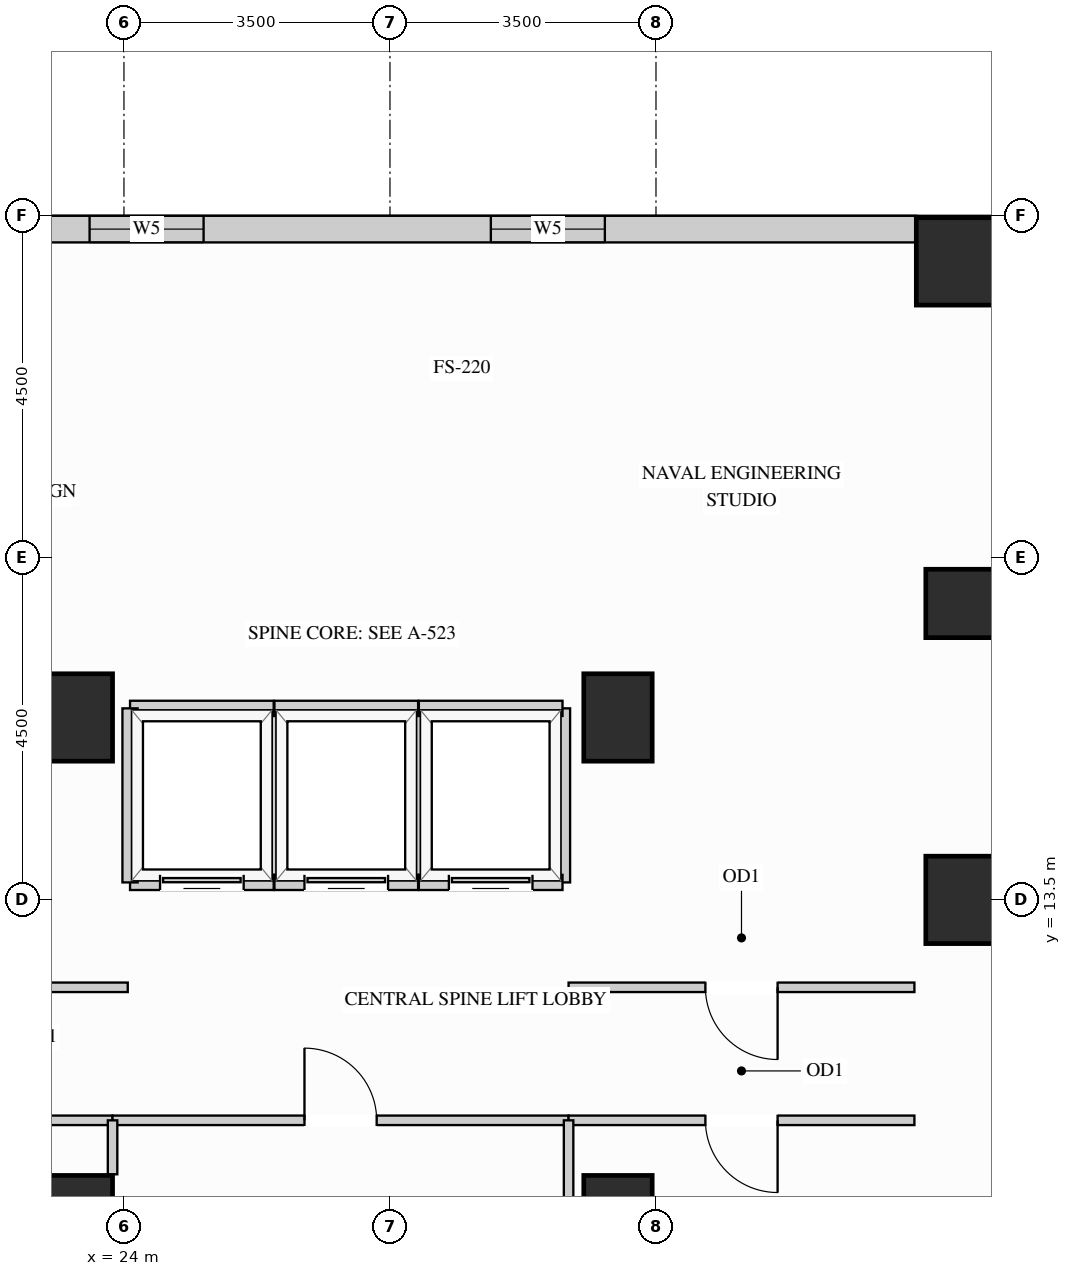
"""IFC4 building model, lengths in metres.
Left out: names, types, materials, properties, quantities, classifications, styles, units other than length and angle.
Written with IfcOpenShell. Run it as: python <this file> out.ifc"""

import sys

from ifc_helpers import new_model, si_unit, direction, frame, frame_2d, origin, origin_2d, place, context, subcontext, project, spatial, rectangle, extrude, source, transform, mapped, element, fill, save


model = new_model("IFC4")
c1 = context("Model", 3, precision=1e-05, world=origin(), true_north=direction((0.0, 1.0)))
c2 = subcontext(c1, "Body", "Model", "MODEL_VIEW")
j1 = project(units=[si_unit("LENGTHUNIT", "METRE"), si_unit("PLANEANGLEUNIT", "RADIAN")], contexts=[c1])
p1 = place(None, origin())
s1 = spatial("IfcSite", under=j1, at=p1, CompositionType="ELEMENT")
p2 = place(p1, origin())
s2 = spatial("IfcBuilding", under=s1, at=p2, CompositionType="ELEMENT")
p3 = place(p2, frame((0.0, 0.0, 84.6)))
s3 = spatial("IfcBuildingStorey", under=s2, at=p3, CompositionType="ELEMENT", Elevation=84.6)
m1 = source(origin(), c2, "Body", "SweptSolid", [
    extrude(rectangle(XDim=0.9, YDim=0.9, at=origin_2d()), origin(), (0.0, 0.0, 1.0), 3.38),
])
p4 = place(p3, frame((35.0, 17.4, 0.0), z_axis=(0.0, 0.0, 1.0), x_axis=(1.0, 0.0, 0.0)))
e1 = element("IfcColumn", 1, at=p4, inside=s3, PredefinedType="COLUMN", context=c2, shape_type="MappedRepresentation", body=[
    mapped(m1, transform((0.0, 0.0, 0.0), x_axis=(1.0, 0.0, 0.0), y_axis=(0.0, 1.0, 0.0), z_axis=(0.0, 0.0, 1.0))),
])
m2 = source(origin(), c2, "Body", "SweptSolid", [
    extrude(rectangle(XDim=0.9, YDim=1.15, at=origin_2d()), origin(), (0.0, 0.0, 1.0), 3.38),
])
for number, where, z_axis, x_axis in (
    (2, (35.0, 13.5, 0.0), (0.0, 0.0, 1.0), (1.0, 0.0, 0.0)),
    (3, (23.4, 15.9, 0.0), (0.0, 0.0, 1.0), (1.0, 0.0, 0.0)),
    (4, (23.4, 9.3, 0.0), (0.0, 0.0, 1.0), (1.0, 0.0, 0.0)),
    (5, (30.5, 15.9, 0.0), (0.0, 0.0, 1.0), (1.0, 0.0, 0.0)),
    (6, (30.5, 9.3, 0.0), (0.0, 0.0, 1.0), (1.0, 0.0, 0.0)),
):
    element("IfcColumn", number, at=place(p3, frame(where, z_axis=z_axis, x_axis=x_axis)), inside=s3, PredefinedType="COLUMN", context=c2, shape_type="MappedRepresentation", body=[
        mapped(m2, transform((0.0, 0.0, 0.0), x_axis=(1.0, 0.0, 0.0), y_axis=(0.0, 1.0, 0.0), z_axis=(0.0, 0.0, 1.0))),
    ])
m3 = source(origin(), c2, "Body", "SweptSolid", [
    extrude(rectangle(XDim=1.15, YDim=1.15, at=origin_2d()), origin(), (0.0, 0.0, 1.0), 3.38),
])
p5 = place(p3, frame((35.0, 21.9, 0.0), z_axis=(0.0, 0.0, 1.0), x_axis=(1.0, 0.0, 0.0)))
e7 = element("IfcColumn", 7, at=p5, inside=s3, PredefinedType="COLUMN", context=c2, shape_type="MappedRepresentation", body=[
    mapped(m3, transform((0.0, 0.0, 0.0), x_axis=(1.0, 0.0, 0.0), y_axis=(0.0, 1.0, 0.0), z_axis=(0.0, 0.0, 1.0))),
])
p6 = place(p3, frame((34.427, 22.325, 0.0), z_axis=(0.0, 0.0, 1.0), x_axis=(-1.0, 0.0, 0.0)))
e8 = element("IfcWall", 8, at=p6, inside=s3, PredefinedType="SOLIDWALL", context=c2, shape_type="SweptSolid", body=[
    extrude(rectangle(XDim=14.979, YDim=0.35, at=frame_2d((7.49, 0.0))), origin(), (0.0, 0.0, 1.0), 3.365),
])
p7 = place(p6, frame((4.1, 0.0, 0.78)))
e9 = element("IfcOpeningElement", 9, at=p7, cuts=e8, PredefinedType="OPENING", context=c2, shape_type="SweptSolid", body=[
    extrude(rectangle(XDim=1.5, YDim=2.0, at=frame_2d((0.75, 1.0))), frame((0.0, 0.185, 0.0), z_axis=(0.0, -1.0, 0.0), x_axis=(1.0, 0.0, 0.0)), (0.0, 0.0, 1.0), 0.37),
])
p8 = place(p6, frame((9.379, 0.0, 0.78)))
e10 = element("IfcOpeningElement", 10, at=p8, cuts=e8, PredefinedType="OPENING", context=c2, shape_type="SweptSolid", body=[
    extrude(rectangle(XDim=1.5, YDim=2.0, at=frame_2d((0.75, 1.0))), frame((0.0, 0.185, 0.0), z_axis=(0.0, -1.0, 0.0), x_axis=(1.0, 0.0, 0.0)), (0.0, 0.0, 1.0), 0.37),
])
p9 = place(p3, frame((29.85, 12.35, 0.0), z_axis=(0.0, 0.0, 1.0), x_axis=(1.0, 0.0, 0.0)))
e11 = element("IfcWall", 11, at=p9, inside=s3, PredefinedType="PARTITIONING", context=c2, shape_type="SweptSolid", body=[
    extrude(rectangle(XDim=4.55, YDim=0.125, at=frame_2d((2.275, 0.0))), origin(), (0.0, 0.0, 1.0), 3.365),
])
p10 = place(p9, frame((1.8, 0.0, 0.0)))
e12 = element("IfcOpeningElement", 12, at=p10, cuts=e11, PredefinedType="OPENING", context=c2, shape_type="SweptSolid", body=[
    extrude(rectangle(XDim=0.95, YDim=2.15, at=frame_2d((0.475, 1.075))), frame((0.0, 0.073, 0.0), z_axis=(0.0, -1.0, 0.0), x_axis=(1.0, 0.0, 0.0)), (0.0, 0.0, 1.0), 0.145),
])
p11 = place(p3, frame((19.5, 12.35, 0.0), z_axis=(0.0, 0.0, 1.0), x_axis=(1.0, 0.0, 0.0)))
e13 = element("IfcWall", 13, at=p11, inside=s3, PredefinedType="PARTITIONING", context=c2, shape_type="SweptSolid", body=[
    extrude(rectangle(XDim=4.55, YDim=0.125, at=frame_2d((2.275, 0.0))), origin(), (0.0, 0.0, 1.0), 3.365),
])
p12 = place(p11, frame((1.8, 0.0, 0.0)))
e14 = element("IfcOpeningElement", 14, at=p12, cuts=e13, PredefinedType="OPENING", context=c2, shape_type="SweptSolid", body=[
    extrude(rectangle(XDim=0.95, YDim=2.15, at=frame_2d((0.475, 1.075))), frame((0.0, 0.073, 0.0), z_axis=(0.0, -1.0, 0.0), x_axis=(1.0, 0.0, 0.0)), (0.0, 0.0, 1.0), 0.145),
])
p13 = place(p3, frame((19.5, 10.6, 0.0), z_axis=(0.0, 0.0, 1.0), x_axis=(1.0, 0.0, 0.0)))
e15 = element("IfcWall", 15, at=p13, inside=s3, PredefinedType="PARTITIONING", context=c2, shape_type="SweptSolid", body=[
    extrude(rectangle(XDim=4.35, YDim=0.125, at=frame_2d((2.175, 0.0))), origin(), (0.0, 0.0, 1.0), 3.365),
])
p14 = place(p13, frame((1.7, 0.0, 0.0)))
e16 = element("IfcOpeningElement", 16, at=p14, cuts=e15, PredefinedType="OPENING", context=c2, shape_type="SweptSolid", body=[
    extrude(rectangle(XDim=0.95, YDim=2.15, at=frame_2d((0.475, 1.075))), frame((0.0, 0.073, 0.0), z_axis=(0.0, -1.0, 0.0), x_axis=(1.0, 0.0, 0.0)), (0.0, 0.0, 1.0), 0.145),
])
p15 = place(p3, frame((23.85, 10.6, 0.0), z_axis=(0.0, 0.0, 1.0), x_axis=(1.0, 0.0, 0.0)))
e17 = element("IfcWall", 17, at=p15, inside=s3, PredefinedType="PARTITIONING", context=c2, shape_type="SweptSolid", body=[
    extrude(rectangle(XDim=6.0, YDim=0.125, at=frame_2d((3.0, 0.0))), origin(), (0.0, 0.0, 1.0), 3.365),
])
p16 = place(p15, frame((2.525, 0.0, 0.0)))
e18 = element("IfcOpeningElement", 18, at=p16, cuts=e17, PredefinedType="OPENING", context=c2, shape_type="SweptSolid", body=[
    extrude(rectangle(XDim=0.95, YDim=2.15, at=frame_2d((0.475, 1.075))), frame((0.0, 0.073, 0.0), z_axis=(0.0, -1.0, 0.0), x_axis=(1.0, 0.0, 0.0)), (0.0, 0.0, 1.0), 0.145),
])
p17 = place(p3, frame((29.85, 10.6, 0.0), z_axis=(0.0, 0.0, 1.0), x_axis=(1.0, 0.0, 0.0)))
e19 = element("IfcWall", 19, at=p17, inside=s3, PredefinedType="PARTITIONING", context=c2, shape_type="SweptSolid", body=[
    extrude(rectangle(XDim=4.55, YDim=0.125, at=frame_2d((2.275, 0.0))), origin(), (0.0, 0.0, 1.0), 3.365),
])
p18 = place(p17, frame((1.8, 0.0, 0.0)))
e20 = element("IfcOpeningElement", 20, at=p18, cuts=e19, PredefinedType="OPENING", context=c2, shape_type="SweptSolid", body=[
    extrude(rectangle(XDim=0.95, YDim=2.15, at=frame_2d((0.475, 1.075))), frame((0.0, 0.073, 0.0), z_axis=(0.0, -1.0, 0.0), x_axis=(1.0, 0.0, 0.0)), (0.0, 0.0, 1.0), 0.145),
])
m4 = source(origin(), c2, "Body", "SweptSolid", [
    extrude(rectangle(XDim=0.71, YDim=0.125, at=frame_2d((0.355, 0.0))), origin(), (0.0, 0.0, 1.0), 3.365),
])
p19 = place(p3, frame((23.85, 9.89, 0.0), z_axis=(0.0, 0.0, 1.0), x_axis=(0.0, 1.0, 0.0)))
e21 = element("IfcWall", 21, at=p19, inside=s3, PredefinedType="PARTITIONING", context=c2, shape_type="MappedRepresentation", body=[
    mapped(m4, transform((0.0, 0.0, 0.0), x_axis=(1.0, 0.0, 0.0), y_axis=(0.0, 1.0, 0.0), z_axis=(0.0, 0.0, 1.0))),
])
m5 = source(origin(), c2, "Body", "SweptSolid", [
    extrude(rectangle(XDim=5.748, YDim=0.125, at=frame_2d((2.874, 0.0))), origin(), (0.0, 0.0, 1.0), 3.365),
])
p20 = place(p3, frame((29.85, 4.852, 0.0), z_axis=(0.0, 0.0, 1.0), x_axis=(0.0, 1.0, 0.0)))
e22 = element("IfcWall", 22, at=p20, inside=s3, PredefinedType="PARTITIONING", context=c2, shape_type="MappedRepresentation", body=[
    mapped(m5, transform((0.0, 0.0, 0.0), x_axis=(1.0, 0.0, 0.0), y_axis=(0.0, 1.0, 0.0), z_axis=(0.0, 0.0, 1.0))),
])
m6 = source(origin(), c2, "Body", "SweptSolid", [
    extrude(rectangle(XDim=2.29, YDim=0.2, at=frame_2d((1.145, 0.0))), origin(), (0.0, 0.0, 1.0), 3.365),
])
p21 = place(p3, frame((25.97, 13.73, 0.0), z_axis=(0.0, 0.0, 1.0), x_axis=(0.0, 1.0, 0.0)))
e23 = element("IfcWall", 23, at=p21, inside=s3, PredefinedType="PARTITIONING", context=c2, shape_type="MappedRepresentation", body=[
    mapped(m6, transform((0.0, 0.0, 0.0), x_axis=(1.0, 0.0, 0.0), y_axis=(0.0, 1.0, 0.0), z_axis=(0.0, 0.0, 1.0))),
])
m7 = source(origin(), c2, "Body", "SweptSolid", [
    extrude(rectangle(XDim=1.89, YDim=0.2, at=frame_2d((0.945, 0.0))), origin(), (0.0, 0.0, 1.0), 2.677),
])
p22 = place(p3, frame((24.08, 16.02, 0.0), z_axis=(0.0, 0.0, 1.0), x_axis=(1.0, 0.0, 0.0)))
e24 = element("IfcWall", 24, at=p22, inside=s3, PredefinedType="PARTITIONING", context=c2, shape_type="MappedRepresentation", body=[
    mapped(m7, transform((0.0, 0.0, 0.0), x_axis=(1.0, 0.0, 0.0), y_axis=(0.0, 1.0, 0.0), z_axis=(0.0, 0.0, 1.0))),
])
p23 = place(p3, frame((24.08, 13.73, 0.0), z_axis=(0.0, 0.0, 1.0), x_axis=(1.0, 0.0, 0.0)))
e25 = element("IfcWall", 25, at=p23, inside=s3, PredefinedType="PARTITIONING", context=c2, shape_type="SweptSolid", body=[
    extrude(rectangle(XDim=1.89, YDim=0.2, at=frame_2d((0.945, 0.0))), origin(), (0.0, 0.0, 1.0), 2.446),
])
p24 = place(p23, frame((0.395, 0.0, 0.0)))
e26 = element("IfcOpeningElement", 26, at=p24, cuts=e25, PredefinedType="OPENING", context=c2, shape_type="SweptSolid", body=[
    extrude(rectangle(XDim=1.1, YDim=2.2, at=frame_2d((0.55, 1.1))), frame((0.0, 0.11, 0.0), z_axis=(0.0, -1.0, 0.0), x_axis=(1.0, 0.0, 0.0)), (0.0, 0.0, 1.0), 0.22),
])
for number, where, z_axis, x_axis in (
    (27, (24.08, 13.73, 0.0), (0.0, 0.0, 1.0), (0.0, 1.0, 0.0)),
    (28, (27.87, 13.73, 0.0), (0.0, 0.0, 1.0), (0.0, 1.0, 0.0)),
):
    element("IfcWall", number, at=place(p3, frame(where, z_axis=z_axis, x_axis=x_axis)), inside=s3, PredefinedType="PARTITIONING", context=c2, shape_type="MappedRepresentation", body=[
        mapped(m6, transform((0.0, 0.0, 0.0), x_axis=(1.0, 0.0, 0.0), y_axis=(0.0, 1.0, 0.0), z_axis=(0.0, 0.0, 1.0))),
    ])
m8 = source(origin(), c2, "Body", "SweptSolid", [
    extrude(rectangle(XDim=1.89, YDim=0.2, at=frame_2d((0.945, 0.0))), origin(), (0.0, 0.0, 1.0), 2.677),
])
p25 = place(p3, frame((25.98, 16.02, 0.0), z_axis=(0.0, 0.0, 1.0), x_axis=(1.0, 0.0, 0.0)))
e29 = element("IfcWall", 29, at=p25, inside=s3, PredefinedType="PARTITIONING", context=c2, shape_type="MappedRepresentation", body=[
    mapped(m8, transform((0.0, 0.0, 0.0), x_axis=(1.0, 0.0, 0.0), y_axis=(0.0, 1.0, 0.0), z_axis=(0.0, 0.0, 1.0))),
])
p26 = place(p3, frame((25.98, 13.73, 0.0), z_axis=(0.0, 0.0, 1.0), x_axis=(1.0, 0.0, 0.0)))
e30 = element("IfcWall", 30, at=p26, inside=s3, PredefinedType="PARTITIONING", context=c2, shape_type="SweptSolid", body=[
    extrude(rectangle(XDim=1.89, YDim=0.2, at=frame_2d((0.945, 0.0))), origin(), (0.0, 0.0, 1.0), 2.446),
])
p27 = place(p26, frame((0.395, 0.0, 0.0)))
e31 = element("IfcOpeningElement", 31, at=p27, cuts=e30, PredefinedType="OPENING", context=c2, shape_type="SweptSolid", body=[
    extrude(rectangle(XDim=1.1, YDim=2.2, at=frame_2d((0.55, 1.1))), frame((0.0, 0.11, 0.0), z_axis=(0.0, -1.0, 0.0), x_axis=(1.0, 0.0, 0.0)), (0.0, 0.0, 1.0), 0.22),
])
p28 = place(p3, frame((29.77, 13.73, 0.0), z_axis=(0.0, 0.0, 1.0), x_axis=(0.0, 1.0, 0.0)))
e32 = element("IfcWall", 32, at=p28, inside=s3, PredefinedType="PARTITIONING", context=c2, shape_type="MappedRepresentation", body=[
    mapped(m6, transform((0.0, 0.0, 0.0), x_axis=(1.0, 0.0, 0.0), y_axis=(0.0, 1.0, 0.0), z_axis=(0.0, 0.0, 1.0))),
])
p29 = place(p3, frame((27.88, 16.02, 0.0), z_axis=(0.0, 0.0, 1.0), x_axis=(1.0, 0.0, 0.0)))
e33 = element("IfcWall", 33, at=p29, inside=s3, PredefinedType="PARTITIONING", context=c2, shape_type="MappedRepresentation", body=[
    mapped(m8, transform((0.0, 0.0, 0.0), x_axis=(1.0, 0.0, 0.0), y_axis=(0.0, 1.0, 0.0), z_axis=(0.0, 0.0, 1.0))),
])
p30 = place(p3, frame((27.88, 13.73, 0.0), z_axis=(0.0, 0.0, 1.0), x_axis=(1.0, 0.0, 0.0)))
e34 = element("IfcWall", 34, at=p30, inside=s3, PredefinedType="PARTITIONING", context=c2, shape_type="SweptSolid", body=[
    extrude(rectangle(XDim=1.89, YDim=0.2, at=frame_2d((0.945, 0.0))), origin(), (0.0, 0.0, 1.0), 2.446),
])
p31 = place(p30, frame((0.395, 0.0, 0.0)))
e35 = element("IfcOpeningElement", 35, at=p31, cuts=e34, PredefinedType="OPENING", context=c2, shape_type="SweptSolid", body=[
    extrude(rectangle(XDim=1.1, YDim=2.2, at=frame_2d((0.55, 1.1))), frame((0.0, 0.11, 0.0), z_axis=(0.0, -1.0, 0.0), x_axis=(1.0, 0.0, 0.0)), (0.0, 0.0, 1.0), 0.22),
])
m9 = source(origin(), c2, "Body", "SweptSolid", [
    extrude(rectangle(XDim=1.1, YDim=2.2, at=frame_2d((0.55, 1.1))), frame((0.0, 0.025, 0.0), z_axis=(0.0, -1.0, 0.0), x_axis=(1.0, 0.0, 0.0)), (0.0, 0.0, 1.0), 0.05),
])
p32 = place(p24, origin())
e36 = element("IfcDoor", 36, at=p32, inside=s3, OperationType="SLIDING_TO_LEFT", PredefinedType="DOOR", context=c2, shape_type="MappedRepresentation", body=[
    mapped(m9, transform((0.0, 0.0, 0.0), x_axis=(1.0, 0.0, 0.0), y_axis=(0.0, 1.0, 0.0), z_axis=(0.0, 0.0, 1.0))),
])
fill(e26, e36)
p33 = place(p27, origin())
e37 = element("IfcDoor", 37, at=p33, inside=s3, OperationType="SLIDING_TO_LEFT", PredefinedType="DOOR", context=c2, shape_type="MappedRepresentation", body=[
    mapped(m9, transform((0.0, 0.0, 0.0), x_axis=(1.0, 0.0, 0.0), y_axis=(0.0, 1.0, 0.0), z_axis=(0.0, 0.0, 1.0))),
])
fill(e31, e37)
p34 = place(p31, origin())
e38 = element("IfcDoor", 38, at=p34, inside=s3, OperationType="SLIDING_TO_LEFT", PredefinedType="DOOR", context=c2, shape_type="MappedRepresentation", body=[
    mapped(m9, transform((0.0, 0.0, 0.0), x_axis=(1.0, 0.0, 0.0), y_axis=(0.0, 1.0, 0.0), z_axis=(0.0, 0.0, 1.0))),
])
fill(e35, e38)
m10 = source(origin(), c2, "Body", "SweptSolid", [
    extrude(rectangle(XDim=0.95, YDim=2.15, at=frame_2d((0.475, 1.075))), frame((0.0, 0.025, 0.0), z_axis=(0.0, -1.0, 0.0), x_axis=(1.0, 0.0, 0.0)), (0.0, 0.0, 1.0), 0.05),
])
p35 = place(p10, origin())
e39 = element("IfcDoor", 39, at=p35, inside=s3, OperationType="SINGLE_SWING_RIGHT", PredefinedType="DOOR", context=c2, shape_type="MappedRepresentation", body=[
    mapped(m10, transform((0.0, 0.0, 0.0), x_axis=(1.0, 0.0, 0.0), y_axis=(0.0, 1.0, 0.0), z_axis=(0.0, 0.0, 1.0))),
])
fill(e12, e39)
p36 = place(p16, origin())
e40 = element("IfcDoor", 40, at=p36, inside=s3, OperationType="SINGLE_SWING_LEFT", PredefinedType="DOOR", context=c2, shape_type="MappedRepresentation", body=[
    mapped(m10, transform((0.0, 0.0, 0.0), x_axis=(1.0, 0.0, 0.0), y_axis=(0.0, 1.0, 0.0), z_axis=(0.0, 0.0, 1.0))),
])
fill(e18, e40)
p37 = place(p18, origin())
e41 = element("IfcDoor", 41, at=p37, inside=s3, OperationType="SINGLE_SWING_RIGHT", PredefinedType="DOOR", context=c2, shape_type="MappedRepresentation", body=[
    mapped(m10, transform((0.0, 0.0, 0.0), x_axis=(1.0, 0.0, 0.0), y_axis=(0.0, 1.0, 0.0), z_axis=(0.0, 0.0, 1.0))),
])
fill(e20, e41)
m11 = source(origin(), c2, "Body", "SweptSolid", [
    extrude(rectangle(XDim=1.5, YDim=2.0, at=frame_2d((0.75, 1.0))), frame((0.0, 0.03, 0.0), z_axis=(0.0, -1.0, 0.0), x_axis=(1.0, 0.0, 0.0)), (0.0, 0.0, 1.0), 0.06),
])
p38 = place(p7, origin())
e42 = element("IfcWindow", 42, at=p38, inside=s3, PartitioningType="SINGLE_PANEL", PredefinedType="WINDOW", context=c2, shape_type="MappedRepresentation", body=[
    mapped(m11, transform((0.0, 0.0, 0.0), x_axis=(1.0, 0.0, 0.0), y_axis=(0.0, 1.0, 0.0), z_axis=(0.0, 0.0, 1.0))),
])
fill(e9, e42)
p39 = place(p8, origin())
e43 = element("IfcWindow", 43, at=p39, inside=s3, PartitioningType="SINGLE_PANEL", PredefinedType="WINDOW", context=c2, shape_type="MappedRepresentation", body=[
    mapped(m11, transform((0.0, 0.0, 0.0), x_axis=(1.0, 0.0, 0.0), y_axis=(0.0, 1.0, 0.0), z_axis=(0.0, 0.0, 1.0))),
])
fill(e10, e43)
save(model, sys.argv[1])
